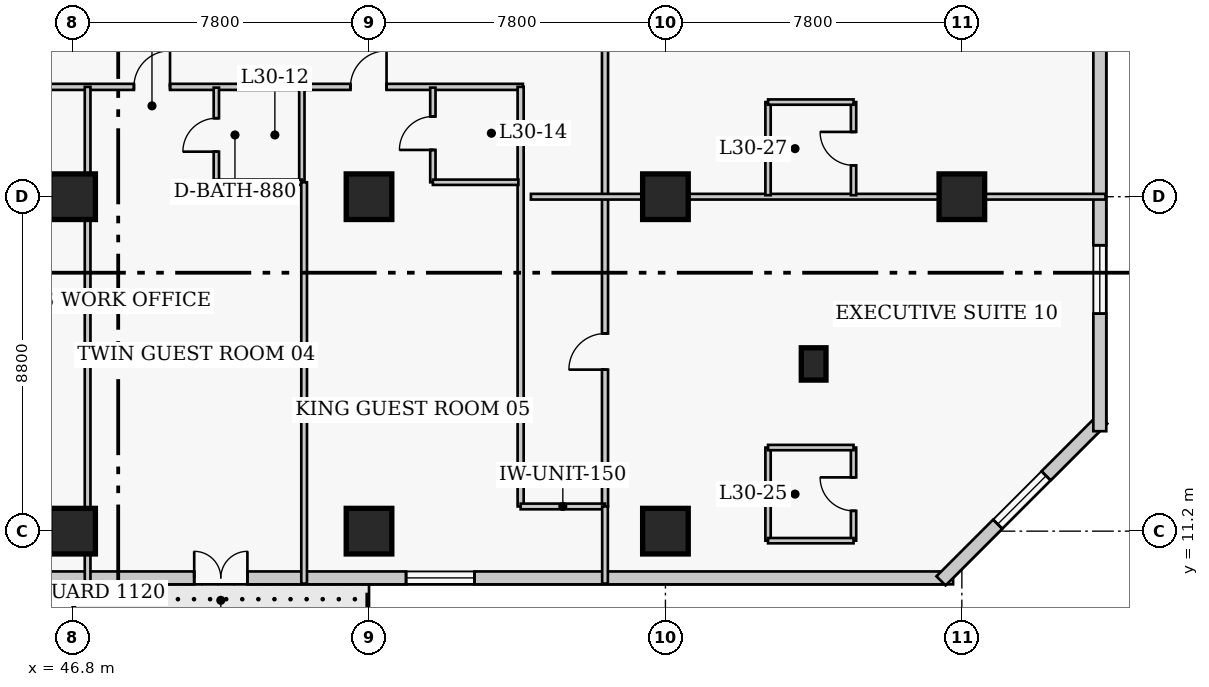
"""IFC4 building model, lengths in metres.
Left out: names, types, materials, properties, quantities, classifications, styles, units other than length and angle.
Written with IfcOpenShell. Run it as: python <this file> out.ifc"""

import sys

from ifc_helpers import new_model, si_unit, direction, frame, frame_2d, origin, origin_2d, place, context, subcontext, project, spatial, rectangle, extrude, element, fill, save


model = new_model("IFC4")
c1 = context("Model", 3, precision=1e-05, world=origin(), true_north=direction((0.0, 1.0)))
c2 = subcontext(c1, "Body", "Model", "MODEL_VIEW")
j1 = project(units=[si_unit("LENGTHUNIT", "METRE"), si_unit("PLANEANGLEUNIT", "RADIAN")], contexts=[c1])
p1 = place(None, origin())
s1 = spatial("IfcSite", under=j1, at=p1, CompositionType="ELEMENT")
p2 = place(p1, origin())
s2 = spatial("IfcBuilding", under=s1, at=p2, CompositionType="ELEMENT")
p3 = place(p2, frame((0.0, 0.0, 122.2)))
s3 = spatial("IfcBuildingStorey", under=s2, at=p3, CompositionType="ELEMENT", Elevation=122.2)
for number, where, z_axis, x_axis in (
    (1, (46.8, 11.2, 0.0), (0.0, 0.0, 1.0), (1.0, 0.0, 0.0)),
    (2, (46.8, 20.0, 0.0), (0.0, 0.0, 1.0), (1.0, 0.0, 0.0)),
    (3, (54.6, 11.2, 0.0), (0.0, 0.0, 1.0), (1.0, 0.0, 0.0)),
    (4, (54.6, 20.0, 0.0), (0.0, 0.0, 1.0), (1.0, 0.0, 0.0)),
    (5, (62.4, 11.2, 0.0), (0.0, 0.0, 1.0), (1.0, 0.0, 0.0)),
    (6, (62.4, 20.0, 0.0), (0.0, 0.0, 1.0), (1.0, 0.0, 0.0)),
    (7, (70.2, 20.0, 0.0), (0.0, 0.0, 1.0), (1.0, 0.0, 0.0)),
):
    element("IfcColumn", number, at=place(p3, frame(where, z_axis=z_axis, x_axis=x_axis)), inside=s3, PredefinedType="COLUMN", context=c2, shape_type="SweptSolid", body=[
        extrude(rectangle(XDim=1.2, YDim=1.2, at=origin_2d()), origin(), (0.0, 0.0, 1.0), 3.8),
    ])
p4 = place(p3, frame((66.3, 15.6, 0.0), z_axis=(0.0, 0.0, 1.0), x_axis=(1.0, 0.0, 0.0)))
e8 = element("IfcColumn", 8, at=p4, inside=s3, PredefinedType="PILASTER", context=c2, shape_type="SweptSolid", body=[
    extrude(rectangle(XDim=0.65, YDim=0.85, at=origin_2d()), origin(), (0.0, 0.0, 1.0), 3.8),
])
p5 = place(p3, frame((41.68, 9.97, 0.0), z_axis=(0.0, 0.0, 1.0), x_axis=(1.0, 0.0, 0.0)))
e9 = element("IfcWall", 9, at=p5, inside=s3, PredefinedType="SOLIDWALL", context=c2, shape_type="SweptSolid", body=[
    extrude(rectangle(XDim=28.29, YDim=0.34, at=frame_2d((14.145, 0.0))), origin(), (0.0, 0.0, 1.0), 3.54),
])
p6 = place(p5, frame((8.32, 0.0, 0.0)))
e10 = element("IfcOpeningElement", 10, at=p6, cuts=e9, PredefinedType="OPENING", context=c2, shape_type="SweptSolid", body=[
    extrude(rectangle(XDim=1.4, YDim=2.15, at=frame_2d((0.7, 1.075))), frame((0.0, 0.18, 0.0), z_axis=(0.0, -1.0, 0.0), x_axis=(1.0, 0.0, 0.0)), (0.0, 0.0, 1.0), 0.36),
])
p7 = place(p5, frame((2.665, 0.0, 0.85)))
e11 = element("IfcOpeningElement", 11, at=p7, cuts=e9, PredefinedType="OPENING", context=c2, shape_type="SweptSolid", body=[
    extrude(rectangle(XDim=1.8, YDim=1.8, at=frame_2d((0.9, 0.9))), frame((0.0, 0.18, 0.0), z_axis=(0.0, -1.0, 0.0), x_axis=(1.0, 0.0, 0.0)), (0.0, 0.0, 1.0), 0.36),
])
p8 = place(p5, frame((13.895, 0.0, 0.85)))
e12 = element("IfcOpeningElement", 12, at=p8, cuts=e9, PredefinedType="OPENING", context=c2, shape_type="SweptSolid", body=[
    extrude(rectangle(XDim=1.8, YDim=1.8, at=frame_2d((0.9, 0.9))), frame((0.0, 0.18, 0.0), z_axis=(0.0, -1.0, 0.0), x_axis=(1.0, 0.0, 0.0)), (0.0, 0.0, 1.0), 0.36),
])
p9 = place(p3, frame((69.652, 9.892, 0.0), z_axis=(0.0, 0.0, 1.0), x_axis=(0.707106781187, 0.707106781187, 0.0)))
e13 = element("IfcWall", 13, at=p9, inside=s3, PredefinedType="SOLIDWALL", context=c2, shape_type="SweptSolid", body=[
    extrude(rectangle(XDim=6.02, YDim=0.34, at=frame_2d((3.01, 0.0))), origin(), (0.0, 0.0, 1.0), 3.54),
])
p10 = place(p9, frame((2.11, 0.0, 0.85)))
e14 = element("IfcOpeningElement", 14, at=p10, cuts=e13, PredefinedType="OPENING", context=c2, shape_type="SweptSolid", body=[
    extrude(rectangle(XDim=1.8, YDim=1.8, at=frame_2d((0.9, 0.9))), frame((0.0, 0.18, 0.0), z_axis=(0.0, -1.0, 0.0), x_axis=(1.0, 0.0, 0.0)), (0.0, 0.0, 1.0), 0.36),
])
p11 = place(p3, frame((73.83, 13.83, 0.0), z_axis=(0.0, 0.0, 1.0), x_axis=(0.0, 1.0, 0.0)))
e15 = element("IfcWall", 15, at=p11, inside=s3, PredefinedType="SOLIDWALL", context=c2, shape_type="SweptSolid", body=[
    extrude(rectangle(XDim=31.94, YDim=0.34, at=frame_2d((15.97, 0.0))), origin(), (0.0, 0.0, 1.0), 3.54),
])
p12 = place(p11, frame((3.093, 0.0, 0.85)))
e16 = element("IfcOpeningElement", 16, at=p12, cuts=e15, PredefinedType="OPENING", context=c2, shape_type="SweptSolid", body=[
    extrude(rectangle(XDim=1.8, YDim=1.8, at=frame_2d((0.9, 0.9))), frame((0.0, 0.18, 0.0), z_axis=(0.0, -1.0, 0.0), x_axis=(1.0, 0.0, 0.0)), (0.0, 0.0, 1.0), 0.36),
])
p13 = place(p11, frame((11.077, 0.0, 0.85)))
e17 = element("IfcOpeningElement", 17, at=p13, cuts=e15, PredefinedType="OPENING", context=c2, shape_type="SweptSolid", body=[
    extrude(rectangle(XDim=1.8, YDim=1.8, at=frame_2d((0.9, 0.9))), frame((0.0, 0.18, 0.0), z_axis=(0.0, -1.0, 0.0), x_axis=(1.0, 0.0, 0.0)), (0.0, 0.0, 1.0), 0.36),
])
p14 = place(p11, frame((19.062, 0.0, 0.85)))
e18 = element("IfcOpeningElement", 18, at=p14, cuts=e15, PredefinedType="OPENING", context=c2, shape_type="SweptSolid", body=[
    extrude(rectangle(XDim=1.8, YDim=1.8, at=frame_2d((0.9, 0.9))), frame((0.0, 0.18, 0.0), z_axis=(0.0, -1.0, 0.0), x_axis=(1.0, 0.0, 0.0)), (0.0, 0.0, 1.0), 0.36),
])
p15 = place(p11, frame((27.048, 0.0, 0.85)))
e19 = element("IfcOpeningElement", 19, at=p15, cuts=e15, PredefinedType="OPENING", context=c2, shape_type="SweptSolid", body=[
    extrude(rectangle(XDim=1.8, YDim=1.8, at=frame_2d((0.9, 0.9))), frame((0.0, 0.18, 0.0), z_axis=(0.0, -1.0, 0.0), x_axis=(1.0, 0.0, 0.0)), (0.0, 0.0, 1.0), 0.36),
])
p16 = place(p3, frame((35.8, 22.89, 0.0), z_axis=(0.0, 0.0, 1.0), x_axis=(1.0, 0.0, 0.0)))
e20 = element("IfcWall", 20, at=p16, inside=s3, PredefinedType="PARTITIONING", context=c2, shape_type="SweptSolid", body=[
    extrude(rectangle(XDim=22.85, YDim=0.16, at=frame_2d((11.425, 0.0))), origin(), (0.0, 0.0, 1.0), 3.54),
])
p17 = place(p16, frame((0.924, 0.0, 0.0)))
e21 = element("IfcOpeningElement", 21, at=p17, cuts=e20, PredefinedType="OPENING", context=c2, shape_type="SweptSolid", body=[
    extrude(rectangle(XDim=0.95, YDim=2.1, at=frame_2d((0.475, 1.05))), frame((0.0, 0.09, 0.0), z_axis=(0.0, -1.0, 0.0), x_axis=(1.0, 0.0, 0.0)), (0.0, 0.0, 1.0), 0.18),
])
p18 = place(p16, frame((8.046, 0.0, 0.0)))
e22 = element("IfcOpeningElement", 22, at=p18, cuts=e20, PredefinedType="OPENING", context=c2, shape_type="SweptSolid", body=[
    extrude(rectangle(XDim=1.0, YDim=2.15, at=frame_2d((0.5, 1.075))), frame((0.0, 0.09, 0.0), z_axis=(0.0, -1.0, 0.0), x_axis=(1.0, 0.0, 0.0)), (0.0, 0.0, 1.0), 0.18),
])
p19 = place(p16, frame((12.614, 0.0, 0.0)))
e23 = element("IfcOpeningElement", 23, at=p19, cuts=e20, PredefinedType="OPENING", context=c2, shape_type="SweptSolid", body=[
    extrude(rectangle(XDim=0.95, YDim=2.1, at=frame_2d((0.475, 1.05))), frame((0.0, 0.09, 0.0), z_axis=(0.0, -1.0, 0.0), x_axis=(1.0, 0.0, 0.0)), (0.0, 0.0, 1.0), 0.18),
])
p20 = place(p16, frame((18.311, 0.0, 0.0)))
e24 = element("IfcOpeningElement", 24, at=p20, cuts=e20, PredefinedType="OPENING", context=c2, shape_type="SweptSolid", body=[
    extrude(rectangle(XDim=0.95, YDim=2.1, at=frame_2d((0.475, 1.05))), frame((0.0, 0.09, 0.0), z_axis=(0.0, -1.0, 0.0), x_axis=(1.0, 0.0, 0.0)), (0.0, 0.0, 1.0), 0.18),
])
p21 = place(p3, frame((60.81, 11.85, 0.0), z_axis=(0.0, 0.0, 1.0), x_axis=(0.0, 1.0, 0.0)))
e25 = element("IfcWall", 25, at=p21, inside=s3, PredefinedType="PARTITIONING", context=c2, shape_type="SweptSolid", body=[
    extrude(rectangle(XDim=28.8, YDim=0.16, at=frame_2d((14.4, 0.0))), origin(), (0.0, 0.0, 1.0), 3.54),
])
p22 = place(p21, frame((3.6, 0.0, 0.0)))
e26 = element("IfcOpeningElement", 26, at=p22, cuts=e25, PredefinedType="OPENING", context=c2, shape_type="SweptSolid", body=[
    extrude(rectangle(XDim=0.95, YDim=2.1, at=frame_2d((0.475, 1.05))), frame((0.0, 0.09, 0.0), z_axis=(0.0, -1.0, 0.0), x_axis=(1.0, 0.0, 0.0)), (0.0, 0.0, 1.0), 0.18),
])
p23 = place(p21, frame((12.075, 0.0, 0.0)))
e27 = element("IfcOpeningElement", 27, at=p23, cuts=e25, PredefinedType="OPENING", context=c2, shape_type="SweptSolid", body=[
    extrude(rectangle(XDim=0.95, YDim=2.1, at=frame_2d((0.475, 1.05))), frame((0.0, 0.09, 0.0), z_axis=(0.0, -1.0, 0.0), x_axis=(1.0, 0.0, 0.0)), (0.0, 0.0, 1.0), 0.18),
])
p24 = place(p21, frame((20.2, 0.0, 0.0)))
e28 = element("IfcOpeningElement", 28, at=p24, cuts=e25, PredefinedType="OPENING", context=c2, shape_type="SweptSolid", body=[
    extrude(rectangle(XDim=0.95, YDim=2.1, at=frame_2d((0.475, 1.05))), frame((0.0, 0.09, 0.0), z_axis=(0.0, -1.0, 0.0), x_axis=(1.0, 0.0, 0.0)), (0.0, 0.0, 1.0), 0.18),
])
p25 = place(p21, frame((27.36, 0.0, 0.0)))
e29 = element("IfcOpeningElement", 29, at=p25, cuts=e25, PredefinedType="OPENING", context=c2, shape_type="SweptSolid", body=[
    extrude(rectangle(XDim=1.0, YDim=2.15, at=frame_2d((0.5, 1.075))), frame((0.0, 0.09, 0.0), z_axis=(0.0, -1.0, 0.0), x_axis=(1.0, 0.0, 0.0)), (0.0, 0.0, 1.0), 0.18),
])
p26 = place(p3, frame((58.59, 11.85, 0.0), z_axis=(0.0, 0.0, 1.0), x_axis=(0.0, 1.0, 0.0)))
e30 = element("IfcWall", 30, at=p26, inside=s3, PredefinedType="PARTITIONING", context=c2, shape_type="SweptSolid", body=[
    extrude(rectangle(XDim=11.04, YDim=0.16, at=frame_2d((5.52, 0.0))), origin(), (0.0, 0.0, 1.0), 3.083),
])
p27 = place(p3, frame((58.59, 11.85, 0.0), z_axis=(0.0, 0.0, 1.0), x_axis=(1.0, 0.0, 0.0)))
e31 = element("IfcWall", 31, at=p27, inside=s3, PredefinedType="PARTITIONING", context=c2, shape_type="SweptSolid", body=[
    extrude(rectangle(XDim=2.22, YDim=0.15, at=frame_2d((1.11, 0.0))), origin(), (0.0, 0.0, 1.0), 3.54),
])
p28 = place(p3, frame((47.195, 9.82, 0.0), z_axis=(0.0, 0.0, 1.0), x_axis=(0.0, 1.0, 0.0)))
e32 = element("IfcWall", 32, at=p28, inside=s3, PredefinedType="PARTITIONING", context=c2, shape_type="SweptSolid", body=[
    extrude(rectangle(XDim=13.07, YDim=0.15, at=frame_2d((6.535, 0.0))), origin(), (0.0, 0.0, 1.0), 3.54),
])
p29 = place(p3, frame((50.583, 20.38, 0.0), z_axis=(0.0, 0.0, 1.0), x_axis=(0.0, 1.0, 0.0)))
e33 = element("IfcWall", 33, at=p29, inside=s3, PredefinedType="PLUMBINGWALL", context=c2, shape_type="SweptSolid", body=[
    extrude(rectangle(XDim=2.49, YDim=0.14, at=frame_2d((1.245, 0.0))), origin(), (0.0, 0.0, 1.0), 3.54),
])
p30 = place(p29, frame((0.805, 0.0, 0.0)))
e34 = element("IfcOpeningElement", 34, at=p30, cuts=e33, PredefinedType="OPENING", context=c2, shape_type="SweptSolid", body=[
    extrude(rectangle(XDim=0.88, YDim=2.05, at=frame_2d((0.44, 1.025))), frame((0.0, 0.08, 0.0), z_axis=(0.0, -1.0, 0.0), x_axis=(1.0, 0.0, 0.0)), (0.0, 0.0, 1.0), 0.16),
])
p31 = place(p3, frame((52.833, 20.38, 0.0), z_axis=(0.0, 0.0, 1.0), x_axis=(0.0, 1.0, 0.0)))
e35 = element("IfcWall", 35, at=p31, inside=s3, PredefinedType="PLUMBINGWALL", context=c2, shape_type="SweptSolid", body=[
    extrude(rectangle(XDim=2.49, YDim=0.14, at=frame_2d((1.245, 0.0))), origin(), (0.0, 0.0, 1.0), 3.54),
])
p32 = place(p3, frame((50.583, 20.38, 0.0), z_axis=(0.0, 0.0, 1.0), x_axis=(1.0, 0.0, 0.0)))
e36 = element("IfcWall", 36, at=p32, inside=s3, PredefinedType="PLUMBINGWALL", context=c2, shape_type="SweptSolid", body=[
    extrude(rectangle(XDim=2.25, YDim=0.14, at=frame_2d((1.125, 0.0))), origin(), (0.0, 0.0, 1.0), 3.54),
])
p33 = place(p3, frame((52.893, 9.82, 0.0), z_axis=(0.0, 0.0, 1.0), x_axis=(0.0, 1.0, 0.0)))
e37 = element("IfcWall", 37, at=p33, inside=s3, PredefinedType="PARTITIONING", context=c2, shape_type="SweptSolid", body=[
    extrude(rectangle(XDim=10.56, YDim=0.15, at=frame_2d((5.28, 0.0))), origin(), (0.0, 0.0, 1.0), 3.54),
])
p34 = place(p3, frame((56.28, 20.38, 0.0), z_axis=(0.0, 0.0, 1.0), x_axis=(0.0, 1.0, 0.0)))
e38 = element("IfcWall", 38, at=p34, inside=s3, PredefinedType="PLUMBINGWALL", context=c2, shape_type="SweptSolid", body=[
    extrude(rectangle(XDim=2.49, YDim=0.14, at=frame_2d((1.245, 0.0))), origin(), (0.0, 0.0, 1.0), 3.54),
])
p35 = place(p34, frame((0.851, 0.0, 0.0)))
e39 = element("IfcOpeningElement", 39, at=p35, cuts=e38, PredefinedType="OPENING", context=c2, shape_type="SweptSolid", body=[
    extrude(rectangle(XDim=0.88, YDim=2.05, at=frame_2d((0.44, 1.025))), frame((0.0, 0.08, 0.0), z_axis=(0.0, -1.0, 0.0), x_axis=(1.0, 0.0, 0.0)), (0.0, 0.0, 1.0), 0.16),
])
p36 = place(p3, frame((56.28, 20.38, 0.0), z_axis=(0.0, 0.0, 1.0), x_axis=(1.0, 0.0, 0.0)))
e40 = element("IfcWall", 40, at=p36, inside=s3, PredefinedType="PLUMBINGWALL", context=c2, shape_type="SweptSolid", body=[
    extrude(rectangle(XDim=2.25, YDim=0.14, at=frame_2d((1.125, 0.0))), origin(), (0.0, 0.0, 1.0), 3.54),
])
p37 = place(p3, frame((60.81, 9.82, 0.0), z_axis=(0.0, 0.0, 1.0), x_axis=(0.0, 1.0, 0.0)))
e41 = element("IfcWall", 41, at=p37, inside=s3, PredefinedType="PARTITIONING", context=c2, shape_type="SweptSolid", body=[
    extrude(rectangle(XDim=2.03, YDim=0.15, at=frame_2d((1.015, 0.0))), origin(), (0.0, 0.0, 1.0), 3.54),
])
p38 = place(p3, frame((58.86, 20.0, 0.0), z_axis=(0.0, 0.0, 1.0), x_axis=(1.0, 0.0, 0.0)))
e42 = element("IfcWall", 42, at=p38, inside=s3, PredefinedType="PARTITIONING", context=c2, shape_type="SweptSolid", body=[
    extrude(rectangle(XDim=15.12, YDim=0.15, at=frame_2d((7.56, 0.0))), origin(), (0.0, 0.0, 1.0), 2.679),
])
p39 = place(p3, frame((65.1, 10.95, 0.0), z_axis=(0.0, 0.0, 1.0), x_axis=(0.0, 1.0, 0.0)))
e43 = element("IfcWall", 43, at=p39, inside=s3, PredefinedType="PLUMBINGWALL", context=c2, shape_type="SweptSolid", body=[
    extrude(rectangle(XDim=2.45, YDim=0.14, at=frame_2d((1.225, 0.0))), origin(), (0.0, 0.0, 1.0), 3.54),
])
p40 = place(p3, frame((67.35, 10.95, 0.0), z_axis=(0.0, 0.0, 1.0), x_axis=(0.0, 1.0, 0.0)))
e44 = element("IfcWall", 44, at=p40, inside=s3, PredefinedType="PLUMBINGWALL", context=c2, shape_type="SweptSolid", body=[
    extrude(rectangle(XDim=2.45, YDim=0.14, at=frame_2d((1.225, 0.0))), origin(), (0.0, 0.0, 1.0), 3.54),
])
p41 = place(p40, frame((0.785, 0.0, 0.0)))
e45 = element("IfcOpeningElement", 45, at=p41, cuts=e44, PredefinedType="OPENING", context=c2, shape_type="SweptSolid", body=[
    extrude(rectangle(XDim=0.88, YDim=2.05, at=frame_2d((0.44, 1.025))), frame((0.0, 0.08, 0.0), z_axis=(0.0, -1.0, 0.0), x_axis=(1.0, 0.0, 0.0)), (0.0, 0.0, 1.0), 0.16),
])
for number, where, z_axis, x_axis in (
    (46, (65.1, 10.95, 0.0), (0.0, 0.0, 1.0), (1.0, 0.0, 0.0)),
    (47, (65.1, 13.4, 0.0), (0.0, 0.0, 1.0), (1.0, 0.0, 0.0)),
):
    element("IfcWall", number, at=place(p3, frame(where, z_axis=z_axis, x_axis=x_axis)), inside=s3, PredefinedType="PLUMBINGWALL", context=c2, shape_type="SweptSolid", body=[
        extrude(rectangle(XDim=2.25, YDim=0.14, at=frame_2d((1.125, 0.0))), origin(), (0.0, 0.0, 1.0), 3.54),
    ])
p42 = place(p3, frame((65.1, 20.04, 0.0), z_axis=(0.0, 0.0, 1.0), x_axis=(0.0, 1.0, 0.0)))
e48 = element("IfcWall", 48, at=p42, inside=s3, PredefinedType="PLUMBINGWALL", context=c2, shape_type="SweptSolid", body=[
    extrude(rectangle(XDim=2.45, YDim=0.14, at=frame_2d((1.225, 0.0))), origin(), (0.0, 0.0, 1.0), 3.54),
])
p43 = place(p3, frame((67.35, 20.04, 0.0), z_axis=(0.0, 0.0, 1.0), x_axis=(0.0, 1.0, 0.0)))
e49 = element("IfcWall", 49, at=p43, inside=s3, PredefinedType="PLUMBINGWALL", context=c2, shape_type="SweptSolid", body=[
    extrude(rectangle(XDim=2.45, YDim=0.14, at=frame_2d((1.225, 0.0))), origin(), (0.0, 0.0, 1.0), 3.54),
])
p44 = place(p43, frame((0.785, 0.0, 0.0)))
e50 = element("IfcOpeningElement", 50, at=p44, cuts=e49, PredefinedType="OPENING", context=c2, shape_type="SweptSolid", body=[
    extrude(rectangle(XDim=0.88, YDim=2.05, at=frame_2d((0.44, 1.025))), frame((0.0, 0.08, 0.0), z_axis=(0.0, -1.0, 0.0), x_axis=(1.0, 0.0, 0.0)), (0.0, 0.0, 1.0), 0.16),
])
p45 = place(p3, frame((65.1, 22.49, 0.0), z_axis=(0.0, 0.0, 1.0), x_axis=(1.0, 0.0, 0.0)))
e51 = element("IfcWall", 51, at=p45, inside=s3, PredefinedType="PLUMBINGWALL", context=c2, shape_type="SweptSolid", body=[
    extrude(rectangle(XDim=2.25, YDim=0.14, at=frame_2d((1.125, 0.0))), origin(), (0.0, 0.0, 1.0), 3.54),
])
p46 = place(p6, origin())
e52 = element("IfcDoor", 52, at=p46, inside=s3, OperationType="DOUBLE_DOOR_SINGLE_SWING", PredefinedType="DOOR", context=c2, shape_type="SweptSolid", body=[
    extrude(rectangle(XDim=1.4, YDim=2.15, at=frame_2d((0.7, 1.075))), frame((0.0, 0.025, 0.0), z_axis=(0.0, -1.0, 0.0), x_axis=(1.0, 0.0, 0.0)), (0.0, 0.0, 1.0), 0.05),
])
fill(e10, e52)
p47 = place(p8, origin())
e53 = element("IfcWindow", 53, at=p47, inside=s3, PartitioningType="SINGLE_PANEL", PredefinedType="WINDOW", context=c2, shape_type="SweptSolid", body=[
    extrude(rectangle(XDim=1.8, YDim=1.8, at=frame_2d((0.9, 0.9))), frame((0.0, 0.03, 0.0), z_axis=(0.0, -1.0, 0.0), x_axis=(1.0, 0.0, 0.0)), (0.0, 0.0, 1.0), 0.06),
])
fill(e12, e53)
p48 = place(p10, origin())
e54 = element("IfcWindow", 54, at=p48, inside=s3, PartitioningType="SINGLE_PANEL", PredefinedType="WINDOW", context=c2, shape_type="SweptSolid", body=[
    extrude(rectangle(XDim=1.8, YDim=1.8, at=frame_2d((0.9, 0.9))), frame((0.0, 0.03, 0.0), z_axis=(0.0, -1.0, 0.0), x_axis=(1.0, 0.0, 0.0)), (0.0, 0.0, 1.0), 0.06),
])
fill(e14, e54)
p49 = place(p12, origin())
e55 = element("IfcWindow", 55, at=p49, inside=s3, PartitioningType="SINGLE_PANEL", PredefinedType="WINDOW", context=c2, shape_type="SweptSolid", body=[
    extrude(rectangle(XDim=1.8, YDim=1.8, at=frame_2d((0.9, 0.9))), frame((0.0, 0.03, 0.0), z_axis=(0.0, -1.0, 0.0), x_axis=(1.0, 0.0, 0.0)), (0.0, 0.0, 1.0), 0.06),
])
fill(e16, e55)
p50 = place(p30, origin())
e56 = element("IfcDoor", 56, at=p50, inside=s3, OperationType="SINGLE_SWING_LEFT", PredefinedType="DOOR", context=c2, shape_type="SweptSolid", body=[
    extrude(rectangle(XDim=0.88, YDim=2.05, at=frame_2d((0.44, 1.025))), frame((0.0, 0.025, 0.0), z_axis=(0.0, -1.0, 0.0), x_axis=(1.0, 0.0, 0.0)), (0.0, 0.0, 1.0), 0.05),
])
fill(e34, e56)
p51 = place(p19, origin())
e57 = element("IfcDoor", 57, at=p51, inside=s3, OperationType="SINGLE_SWING_RIGHT", PredefinedType="DOOR", context=c2, shape_type="SweptSolid", body=[
    extrude(rectangle(XDim=0.95, YDim=2.1, at=frame_2d((0.475, 1.05))), frame((0.0, 0.025, 0.0), z_axis=(0.0, -1.0, 0.0), x_axis=(1.0, 0.0, 0.0)), (0.0, 0.0, 1.0), 0.05),
])
fill(e23, e57)
p52 = place(p35, origin())
e58 = element("IfcDoor", 58, at=p52, inside=s3, OperationType="SINGLE_SWING_LEFT", PredefinedType="DOOR", context=c2, shape_type="SweptSolid", body=[
    extrude(rectangle(XDim=0.88, YDim=2.05, at=frame_2d((0.44, 1.025))), frame((0.0, 0.025, 0.0), z_axis=(0.0, -1.0, 0.0), x_axis=(1.0, 0.0, 0.0)), (0.0, 0.0, 1.0), 0.05),
])
fill(e39, e58)
p53 = place(p20, origin())
e59 = element("IfcDoor", 59, at=p53, inside=s3, OperationType="SINGLE_SWING_RIGHT", PredefinedType="DOOR", context=c2, shape_type="SweptSolid", body=[
    extrude(rectangle(XDim=0.95, YDim=2.1, at=frame_2d((0.475, 1.05))), frame((0.0, 0.025, 0.0), z_axis=(0.0, -1.0, 0.0), x_axis=(1.0, 0.0, 0.0)), (0.0, 0.0, 1.0), 0.05),
])
fill(e24, e59)
p54 = place(p41, origin())
e60 = element("IfcDoor", 60, at=p54, inside=s3, OperationType="SINGLE_SWING_RIGHT", PredefinedType="DOOR", context=c2, shape_type="SweptSolid", body=[
    extrude(rectangle(XDim=0.88, YDim=2.05, at=frame_2d((0.44, 1.025))), frame((0.0, 0.025, 0.0), z_axis=(0.0, -1.0, 0.0), x_axis=(1.0, 0.0, 0.0)), (0.0, 0.0, 1.0), 0.05),
])
fill(e45, e60)
p55 = place(p22, origin())
e61 = element("IfcDoor", 61, at=p55, inside=s3, OperationType="SINGLE_SWING_LEFT", PredefinedType="DOOR", context=c2, shape_type="SweptSolid", body=[
    extrude(rectangle(XDim=0.95, YDim=2.1, at=frame_2d((0.475, 1.05))), frame((0.0, 0.025, 0.0), z_axis=(0.0, -1.0, 0.0), x_axis=(1.0, 0.0, 0.0)), (0.0, 0.0, 1.0), 0.05),
])
fill(e26, e61)
p56 = place(p44, origin())
e62 = element("IfcDoor", 62, at=p56, inside=s3, OperationType="SINGLE_SWING_RIGHT", PredefinedType="DOOR", context=c2, shape_type="SweptSolid", body=[
    extrude(rectangle(XDim=0.88, YDim=2.05, at=frame_2d((0.44, 1.025))), frame((0.0, 0.025, 0.0), z_axis=(0.0, -1.0, 0.0), x_axis=(1.0, 0.0, 0.0)), (0.0, 0.0, 1.0), 0.05),
])
fill(e50, e62)
save(model, sys.argv[1])
